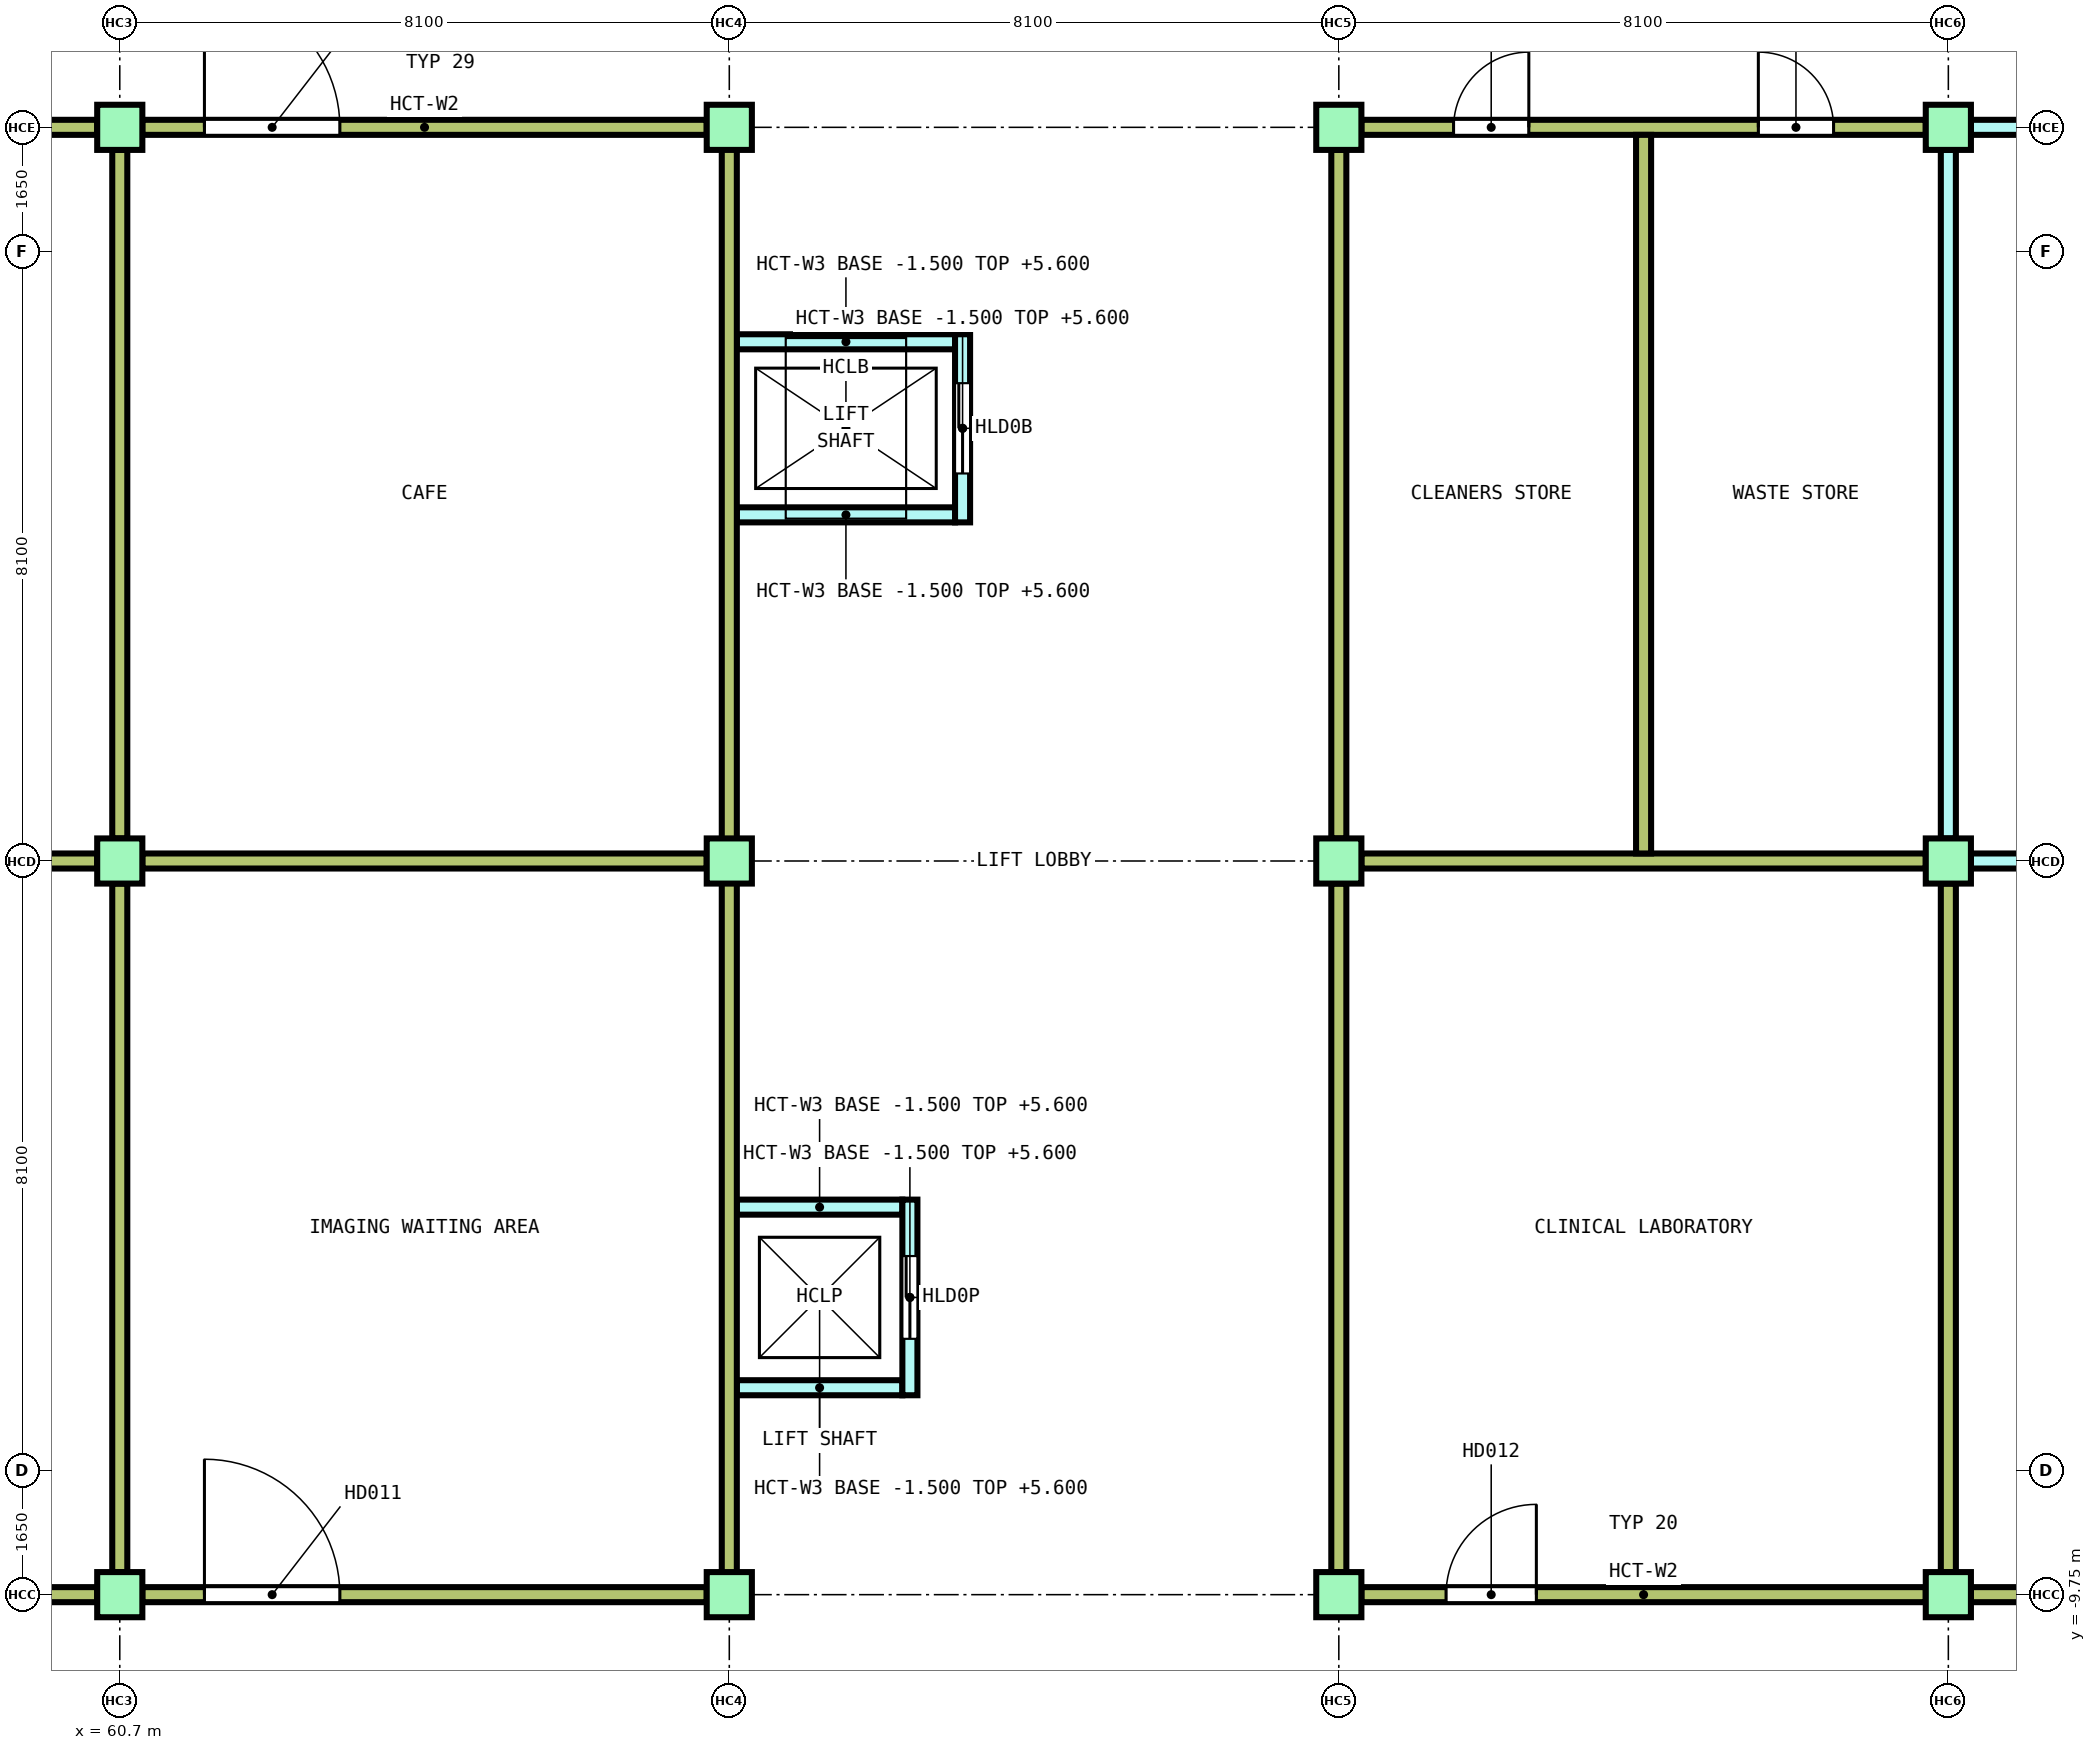
"""IFC4 building model, lengths in metres.
Left out: names, types, materials, properties, quantities, classifications, styles, units other than length and angle.
Written with IfcOpenShell. Run it as: python <this file> out.ifc"""

import sys

from ifc_helpers import new_model, si_unit, direction, frame, frame_2d, origin, origin_2d, place, context, subcontext, project, spatial, rectangle, extrude, element, fill, save


model = new_model("IFC4")
c1 = context("Model", 3, precision=1e-05, world=origin(), true_north=direction((0.0, 1.0)))
c2 = subcontext(c1, "Body", "Model", "MODEL_VIEW")
j1 = project(units=[si_unit("LENGTHUNIT", "METRE"), si_unit("PLANEANGLEUNIT", "RADIAN")], contexts=[c1])
p1 = place(None, origin())
s1 = spatial("IfcSite", under=j1, at=p1, CompositionType="ELEMENT")
p2 = place(p1, origin())
s2 = spatial("IfcBuilding", under=s1, at=p2, CompositionType="ELEMENT")
p3 = place(p2, origin())
s3 = spatial("IfcBuildingStorey", under=s2, at=p3, CompositionType="ELEMENT", Elevation=0.0)
for number, where, z_axis, x_axis in (
    (1, (60.7, -9.75, -0.25), (0.0, 0.0, 1.0), (1.0, 0.0, 0.0)),
    (2, (68.8, -9.75, -0.25), (0.0, 0.0, 1.0), (1.0, 0.0, 0.0)),
    (3, (76.9, -9.75, -0.25), (0.0, 0.0, 1.0), (1.0, 0.0, 0.0)),
    (4, (85.0, -9.75, -0.25), (0.0, 0.0, 1.0), (1.0, 0.0, 0.0)),
    (5, (60.7, 0.0, -0.25), (0.0, 0.0, 1.0), (1.0, 0.0, 0.0)),
    (6, (68.8, 0.0, -0.25), (0.0, 0.0, 1.0), (1.0, 0.0, 0.0)),
    (7, (76.9, 0.0, -0.25), (0.0, 0.0, 1.0), (1.0, 0.0, 0.0)),
    (8, (85.0, 0.0, -0.25), (0.0, 0.0, 1.0), (1.0, 0.0, 0.0)),
    (9, (60.7, 9.75, -0.25), (0.0, 0.0, 1.0), (1.0, 0.0, 0.0)),
    (10, (68.8, 9.75, -0.25), (0.0, 0.0, 1.0), (1.0, 0.0, 0.0)),
    (11, (76.9, 9.75, -0.25), (0.0, 0.0, 1.0), (1.0, 0.0, 0.0)),
    (12, (85.0, 9.75, -0.25), (0.0, 0.0, 1.0), (1.0, 0.0, 0.0)),
):
    element("IfcColumn", number, at=place(p3, frame(where, z_axis=z_axis, x_axis=x_axis)), inside=s3, PredefinedType="COLUMN", context=c2, shape_type="SweptSolid", body=[
        extrude(rectangle(XDim=0.6, YDim=0.6, at=origin_2d()), origin(), (0.0, 0.0, 1.0), 5.85),
    ])
for number, where, z_axis, x_axis in (
    (13, (68.9, -7.0, -1.5), (0.0, 0.0, 1.0), (1.0, 0.0, 0.0)),
    (14, (68.9, -4.6, -1.5), (0.0, 0.0, 1.0), (1.0, 0.0, 0.0)),
):
    element("IfcWall", number, at=place(p3, frame(where, z_axis=z_axis, x_axis=x_axis)), inside=s3, PredefinedType="SOLIDWALL", context=c2, shape_type="SweptSolid", body=[
        extrude(rectangle(XDim=2.2, YDim=0.2, at=frame_2d((1.1, 0.0))), origin(), (0.0, 0.0, 1.0), 7.1),
    ])
p4 = place(p3, frame((71.2, -7.1, -1.5), z_axis=(0.0, 0.0, 1.0), x_axis=(0.0, 1.0, 0.0)))
e15 = element("IfcWall", 15, at=p4, inside=s3, PredefinedType="SOLIDWALL", context=c2, shape_type="SweptSolid", body=[
    extrude(rectangle(XDim=2.6, YDim=0.2, at=frame_2d((1.3, 0.0))), origin(), (0.0, 0.0, 1.0), 7.1),
])
p5 = place(p4, frame((0.75, 0.0, 1.5)))
e16 = element("IfcOpeningElement", 16, at=p5, cuts=e15, PredefinedType="OPENING", context=c2, shape_type="SweptSolid", body=[
    extrude(rectangle(XDim=1.1, YDim=2.1, at=frame_2d((0.55, 1.05))), frame((0.0, 0.11, 0.0), z_axis=(0.0, -1.0, 0.0), x_axis=(1.0, 0.0, 0.0)), (0.0, 0.0, 1.0), 0.22),
])
for number, where, z_axis, x_axis in (
    (17, (68.9, 4.6, -1.5), (0.0, 0.0, 1.0), (1.0, 0.0, 0.0)),
    (18, (68.9, 6.9, -1.5), (0.0, 0.0, 1.0), (1.0, 0.0, 0.0)),
):
    element("IfcWall", number, at=place(p3, frame(where, z_axis=z_axis, x_axis=x_axis)), inside=s3, PredefinedType="SOLIDWALL", context=c2, shape_type="SweptSolid", body=[
        extrude(rectangle(XDim=2.9, YDim=0.2, at=frame_2d((1.45, 0.0))), origin(), (0.0, 0.0, 1.0), 7.1),
    ])
p6 = place(p3, frame((71.9, 4.5, -1.5), z_axis=(0.0, 0.0, 1.0), x_axis=(0.0, 1.0, 0.0)))
e19 = element("IfcWall", 19, at=p6, inside=s3, PredefinedType="SOLIDWALL", context=c2, shape_type="SweptSolid", body=[
    extrude(rectangle(XDim=2.5, YDim=0.2, at=frame_2d((1.25, 0.0))), origin(), (0.0, 0.0, 1.0), 7.1),
])
p7 = place(p6, frame((0.65, 0.0, 1.5)))
e20 = element("IfcOpeningElement", 20, at=p7, cuts=e19, PredefinedType="OPENING", context=c2, shape_type="SweptSolid", body=[
    extrude(rectangle(XDim=1.2, YDim=2.1, at=frame_2d((0.6, 1.05))), frame((0.0, 0.11, 0.0), z_axis=(0.0, -1.0, 0.0), x_axis=(1.0, 0.0, 0.0)), (0.0, 0.0, 1.0), 0.22),
])
for number, where, z_axis, x_axis in (
    (21, (60.7, -9.45, 0.0), (0.0, 0.0, 1.0), (0.0, 1.0, 0.0)),
    (22, (60.7, 0.3, 0.0), (0.0, 0.0, 1.0), (0.0, 1.0, 0.0)),
):
    element("IfcWall", number, at=place(p3, frame(where, z_axis=z_axis, x_axis=x_axis)), inside=s3, PredefinedType="PARTITIONING", context=c2, shape_type="SweptSolid", body=[
        extrude(rectangle(XDim=9.15, YDim=0.2, at=frame_2d((4.575, 0.0))), origin(), (0.0, 0.0, 1.0), 4.8),
    ])
p8 = place(p3, frame((52.9, -9.75, 0.0), z_axis=(0.0, 0.0, 1.0), x_axis=(1.0, 0.0, 0.0)))
e23 = element("IfcWall", 23, at=p8, inside=s3, PredefinedType="PARTITIONING", context=c2, shape_type="SweptSolid", body=[
    extrude(rectangle(XDim=7.5, YDim=0.2, at=frame_2d((3.75, 0.0))), origin(), (0.0, 0.0, 1.0), 4.8),
])
p9 = place(p8, frame((1.125, 0.0, 0.0)))
e24 = element("IfcOpeningElement", 24, at=p9, cuts=e23, PredefinedType="OPENING", context=c2, shape_type="SweptSolid", body=[
    extrude(rectangle(XDim=1.2, YDim=2.1, at=frame_2d((0.6, 1.05))), frame((0.0, 0.11, 0.0), z_axis=(0.0, -1.0, 0.0), x_axis=(1.0, 0.0, 0.0)), (0.0, 0.0, 1.0), 0.22),
])
p10 = place(p3, frame((61.0, -9.75, 0.0), z_axis=(0.0, 0.0, 1.0), x_axis=(1.0, 0.0, 0.0)))
e25 = element("IfcWall", 25, at=p10, inside=s3, PredefinedType="PARTITIONING", context=c2, shape_type="SweptSolid", body=[
    extrude(rectangle(XDim=7.5, YDim=0.2, at=frame_2d((3.75, 0.0))), origin(), (0.0, 0.0, 1.0), 4.8),
])
p11 = place(p10, frame((0.825, 0.0, 0.0)))
e26 = element("IfcOpeningElement", 26, at=p11, cuts=e25, PredefinedType="OPENING", context=c2, shape_type="SweptSolid", body=[
    extrude(rectangle(XDim=1.8, YDim=2.1, at=frame_2d((0.9, 1.05))), frame((0.0, 0.11, 0.0), z_axis=(0.0, -1.0, 0.0), x_axis=(1.0, 0.0, 0.0)), (0.0, 0.0, 1.0), 0.22),
])
p12 = place(p3, frame((77.2, -9.75, 0.0), z_axis=(0.0, 0.0, 1.0), x_axis=(1.0, 0.0, 0.0)))
e27 = element("IfcWall", 27, at=p12, inside=s3, PredefinedType="PARTITIONING", context=c2, shape_type="SweptSolid", body=[
    extrude(rectangle(XDim=7.5, YDim=0.2, at=frame_2d((3.75, 0.0))), origin(), (0.0, 0.0, 1.0), 4.8),
])
p13 = place(p12, frame((1.125, 0.0, 0.0)))
e28 = element("IfcOpeningElement", 28, at=p13, cuts=e27, PredefinedType="OPENING", context=c2, shape_type="SweptSolid", body=[
    extrude(rectangle(XDim=1.2, YDim=2.1, at=frame_2d((0.6, 1.05))), frame((0.0, 0.11, 0.0), z_axis=(0.0, -1.0, 0.0), x_axis=(1.0, 0.0, 0.0)), (0.0, 0.0, 1.0), 0.22),
])
p14 = place(p3, frame((85.3, -9.75, 0.0), z_axis=(0.0, 0.0, 1.0), x_axis=(1.0, 0.0, 0.0)))
e29 = element("IfcWall", 29, at=p14, inside=s3, PredefinedType="PARTITIONING", context=c2, shape_type="SweptSolid", body=[
    extrude(rectangle(XDim=7.5, YDim=0.2, at=frame_2d((3.75, 0.0))), origin(), (0.0, 0.0, 1.0), 4.8),
])
p15 = place(p14, frame((1.225, 0.0, 0.0)))
e30 = element("IfcOpeningElement", 30, at=p15, cuts=e29, PredefinedType="OPENING", context=c2, shape_type="SweptSolid", body=[
    extrude(rectangle(XDim=1.0, YDim=2.1, at=frame_2d((0.5, 1.05))), frame((0.0, 0.11, 0.0), z_axis=(0.0, -1.0, 0.0), x_axis=(1.0, 0.0, 0.0)), (0.0, 0.0, 1.0), 0.22),
])
p16 = place(p14, frame((5.275, 0.0, 0.0)))
e31 = element("IfcOpeningElement", 31, at=p16, cuts=e29, PredefinedType="OPENING", context=c2, shape_type="SweptSolid", body=[
    extrude(rectangle(XDim=1.0, YDim=2.1, at=frame_2d((0.5, 1.05))), frame((0.0, 0.11, 0.0), z_axis=(0.0, -1.0, 0.0), x_axis=(1.0, 0.0, 0.0)), (0.0, 0.0, 1.0), 0.22),
])
p17 = place(p3, frame((85.0, -9.45, 0.0), z_axis=(0.0, 0.0, 1.0), x_axis=(0.0, 1.0, 0.0)))
e32 = element("IfcWall", 32, at=p17, inside=s3, PredefinedType="PARTITIONING", context=c2, shape_type="SweptSolid", body=[
    extrude(rectangle(XDim=9.15, YDim=0.2, at=frame_2d((4.575, 0.0))), origin(), (0.0, 0.0, 1.0), 4.8),
])
p18 = place(p3, frame((85.0, 0.3, 0.0), z_axis=(0.0, 0.0, 1.0), x_axis=(0.0, 1.0, 0.0)))
e33 = element("IfcWall", 33, at=p18, inside=s3, PredefinedType="SOLIDWALL", context=c2, shape_type="SweptSolid", body=[
    extrude(rectangle(XDim=9.15, YDim=0.2, at=frame_2d((4.575, 0.0))), origin(), (0.0, 0.0, 1.0), 4.8),
])
for number, where, z_axis, x_axis in (
    (34, (52.9, 0.0, 0.0), (0.0, 0.0, 1.0), (1.0, 0.0, 0.0)),
    (35, (61.0, 0.0, 0.0), (0.0, 0.0, 1.0), (1.0, 0.0, 0.0)),
    (36, (77.2, 0.0, 0.0), (0.0, 0.0, 1.0), (1.0, 0.0, 0.0)),
):
    element("IfcWall", number, at=place(p3, frame(where, z_axis=z_axis, x_axis=x_axis)), inside=s3, PredefinedType="PARTITIONING", context=c2, shape_type="SweptSolid", body=[
        extrude(rectangle(XDim=7.5, YDim=0.2, at=frame_2d((3.75, 0.0))), origin(), (0.0, 0.0, 1.0), 4.8),
    ])
p19 = place(p3, frame((85.3, 0.0, 0.0), z_axis=(0.0, 0.0, 1.0), x_axis=(1.0, 0.0, 0.0)))
e37 = element("IfcWall", 37, at=p19, inside=s3, PredefinedType="SOLIDWALL", context=c2, shape_type="SweptSolid", body=[
    extrude(rectangle(XDim=7.5, YDim=0.2, at=frame_2d((3.75, 0.0))), origin(), (0.0, 0.0, 1.0), 4.8),
])
p20 = place(p3, frame((68.8, -9.75, 0.0), z_axis=(0.0, 0.0, 1.0), x_axis=(0.0, 1.0, 0.0)))
e38 = element("IfcWall", 38, at=p20, inside=s3, PredefinedType="PARTITIONING", context=c2, shape_type="SweptSolid", body=[
    extrude(rectangle(XDim=19.5, YDim=0.2, at=frame_2d((9.75, 0.0))), origin(), (0.0, 0.0, 1.0), 4.8),
])
for number, where, z_axis, x_axis in (
    (39, (76.9, -9.45, 0.0), (0.0, 0.0, 1.0), (0.0, 1.0, 0.0)),
    (40, (76.9, 0.3, 0.0), (0.0, 0.0, 1.0), (0.0, 1.0, 0.0)),
):
    element("IfcWall", number, at=place(p3, frame(where, z_axis=z_axis, x_axis=x_axis)), inside=s3, PredefinedType="PARTITIONING", context=c2, shape_type="SweptSolid", body=[
        extrude(rectangle(XDim=9.15, YDim=0.2, at=frame_2d((4.575, 0.0))), origin(), (0.0, 0.0, 1.0), 4.8),
    ])
p21 = place(p3, frame((52.9, 9.75, 0.0), z_axis=(0.0, 0.0, 1.0), x_axis=(1.0, 0.0, 0.0)))
e41 = element("IfcWall", 41, at=p21, inside=s3, PredefinedType="PARTITIONING", context=c2, shape_type="SweptSolid", body=[
    extrude(rectangle(XDim=7.5, YDim=0.2, at=frame_2d((3.75, 0.0))), origin(), (0.0, 0.0, 1.0), 4.8),
])
p22 = place(p21, frame((1.225, 0.0, 0.0)))
e42 = element("IfcOpeningElement", 42, at=p22, cuts=e41, PredefinedType="OPENING", context=c2, shape_type="SweptSolid", body=[
    extrude(rectangle(XDim=1.0, YDim=2.1, at=frame_2d((0.5, 1.05))), frame((0.0, 0.11, 0.0), z_axis=(0.0, -1.0, 0.0), x_axis=(1.0, 0.0, 0.0)), (0.0, 0.0, 1.0), 0.22),
])
p23 = place(p3, frame((61.0, 9.75, 0.0), z_axis=(0.0, 0.0, 1.0), x_axis=(1.0, 0.0, 0.0)))
e43 = element("IfcWall", 43, at=p23, inside=s3, PredefinedType="PARTITIONING", context=c2, shape_type="SweptSolid", body=[
    extrude(rectangle(XDim=7.5, YDim=0.2, at=frame_2d((3.75, 0.0))), origin(), (0.0, 0.0, 1.0), 4.8),
])
p24 = place(p23, frame((0.825, 0.0, 0.0)))
e44 = element("IfcOpeningElement", 44, at=p24, cuts=e43, PredefinedType="OPENING", context=c2, shape_type="SweptSolid", body=[
    extrude(rectangle(XDim=1.8, YDim=2.1, at=frame_2d((0.9, 1.05))), frame((0.0, 0.11, 0.0), z_axis=(0.0, -1.0, 0.0), x_axis=(1.0, 0.0, 0.0)), (0.0, 0.0, 1.0), 0.22),
])
p25 = place(p3, frame((77.2, 9.75, 0.0), z_axis=(0.0, 0.0, 1.0), x_axis=(1.0, 0.0, 0.0)))
e45 = element("IfcWall", 45, at=p25, inside=s3, PredefinedType="PARTITIONING", context=c2, shape_type="SweptSolid", body=[
    extrude(rectangle(XDim=7.5, YDim=0.2, at=frame_2d((3.75, 0.0))), origin(), (0.0, 0.0, 1.0), 4.8),
])
p26 = place(p25, frame((1.225, 0.0, 0.0)))
e46 = element("IfcOpeningElement", 46, at=p26, cuts=e45, PredefinedType="OPENING", context=c2, shape_type="SweptSolid", body=[
    extrude(rectangle(XDim=1.0, YDim=2.1, at=frame_2d((0.5, 1.05))), frame((0.0, 0.11, 0.0), z_axis=(0.0, -1.0, 0.0), x_axis=(1.0, 0.0, 0.0)), (0.0, 0.0, 1.0), 0.22),
])
p27 = place(p25, frame((5.275, 0.0, 0.0)))
e47 = element("IfcOpeningElement", 47, at=p27, cuts=e45, PredefinedType="OPENING", context=c2, shape_type="SweptSolid", body=[
    extrude(rectangle(XDim=1.0, YDim=2.1, at=frame_2d((0.5, 1.05))), frame((0.0, 0.11, 0.0), z_axis=(0.0, -1.0, 0.0), x_axis=(1.0, 0.0, 0.0)), (0.0, 0.0, 1.0), 0.22),
])
p28 = place(p3, frame((85.3, 9.75, 0.0), z_axis=(0.0, 0.0, 1.0), x_axis=(1.0, 0.0, 0.0)))
e48 = element("IfcWall", 48, at=p28, inside=s3, PredefinedType="SOLIDWALL", context=c2, shape_type="SweptSolid", body=[
    extrude(rectangle(XDim=7.5, YDim=0.2, at=frame_2d((3.75, 0.0))), origin(), (0.0, 0.0, 1.0), 4.8),
])
p29 = place(p28, frame((1.225, 0.0, 0.0)))
e49 = element("IfcOpeningElement", 49, at=p29, cuts=e48, PredefinedType="OPENING", context=c2, shape_type="SweptSolid", body=[
    extrude(rectangle(XDim=1.0, YDim=2.1, at=frame_2d((0.5, 1.05))), frame((0.0, 0.11, 0.0), z_axis=(0.0, -1.0, 0.0), x_axis=(1.0, 0.0, 0.0)), (0.0, 0.0, 1.0), 0.22),
])
p30 = place(p3, frame((80.95, 0.1, 0.0), z_axis=(0.0, 0.0, 1.0), x_axis=(0.0, 1.0, 0.0)))
e50 = element("IfcWall", 50, at=p30, inside=s3, PredefinedType="PARTITIONING", context=c2, shape_type="SweptSolid", body=[
    extrude(rectangle(XDim=9.55, YDim=0.2, at=frame_2d((4.775, 0.0))), origin(), (0.0, 0.0, 1.0), 4.8),
])
p31 = place(p5, origin())
e51 = element("IfcDoor", 51, at=p31, inside=s3, OperationType="SLIDING_TO_LEFT", PredefinedType="DOOR", context=c2, shape_type="SweptSolid", body=[
    extrude(rectangle(XDim=1.1, YDim=2.1, at=frame_2d((0.55, 1.05))), frame((0.0, 0.025, 0.0), z_axis=(0.0, -1.0, 0.0), x_axis=(1.0, 0.0, 0.0)), (0.0, 0.0, 1.0), 0.05),
])
fill(e16, e51)
p32 = place(p7, origin())
e52 = element("IfcDoor", 52, at=p32, inside=s3, OperationType="SLIDING_TO_LEFT", PredefinedType="DOOR", context=c2, shape_type="SweptSolid", body=[
    extrude(rectangle(XDim=1.2, YDim=2.1, at=frame_2d((0.6, 1.05))), frame((0.0, 0.025, 0.0), z_axis=(0.0, -1.0, 0.0), x_axis=(1.0, 0.0, 0.0)), (0.0, 0.0, 1.0), 0.05),
])
fill(e20, e52)
p33 = place(p11, origin())
e53 = element("IfcDoor", 53, at=p33, inside=s3, OperationType="DOUBLE_DOOR_SINGLE_SWING", PredefinedType="DOOR", context=c2, shape_type="SweptSolid", body=[
    extrude(rectangle(XDim=1.8, YDim=2.1, at=frame_2d((0.9, 1.05))), frame((0.0, 0.025, 0.0), z_axis=(0.0, -1.0, 0.0), x_axis=(1.0, 0.0, 0.0)), (0.0, 0.0, 1.0), 0.05),
])
fill(e26, e53)
p34 = place(p13, origin())
e54 = element("IfcDoor", 54, at=p34, inside=s3, OperationType="SINGLE_SWING_LEFT", PredefinedType="DOOR", context=c2, shape_type="SweptSolid", body=[
    extrude(rectangle(XDim=1.2, YDim=2.1, at=frame_2d((0.6, 1.05))), frame((0.0, 0.025, 0.0), z_axis=(0.0, -1.0, 0.0), x_axis=(1.0, 0.0, 0.0)), (0.0, 0.0, 1.0), 0.05),
])
fill(e28, e54)
p35 = place(p24, origin())
e55 = element("IfcDoor", 55, at=p35, inside=s3, OperationType="DOUBLE_DOOR_SINGLE_SWING", PredefinedType="DOOR", context=c2, shape_type="SweptSolid", body=[
    extrude(rectangle(XDim=1.8, YDim=2.1, at=frame_2d((0.9, 1.05))), frame((0.0, 0.025, 0.0), z_axis=(0.0, -1.0, 0.0), x_axis=(1.0, 0.0, 0.0)), (0.0, 0.0, 1.0), 0.05),
])
fill(e44, e55)
p36 = place(p26, origin())
e56 = element("IfcDoor", 56, at=p36, inside=s3, OperationType="SINGLE_SWING_LEFT", PredefinedType="DOOR", context=c2, shape_type="SweptSolid", body=[
    extrude(rectangle(XDim=1.0, YDim=2.1, at=frame_2d((0.5, 1.05))), frame((0.0, 0.025, 0.0), z_axis=(0.0, -1.0, 0.0), x_axis=(1.0, 0.0, 0.0)), (0.0, 0.0, 1.0), 0.05),
])
fill(e46, e56)
p37 = place(p27, origin())
e57 = element("IfcDoor", 57, at=p37, inside=s3, OperationType="SINGLE_SWING_RIGHT", PredefinedType="DOOR", context=c2, shape_type="SweptSolid", body=[
    extrude(rectangle(XDim=1.0, YDim=2.1, at=frame_2d((0.5, 1.05))), frame((0.0, 0.025, 0.0), z_axis=(0.0, -1.0, 0.0), x_axis=(1.0, 0.0, 0.0)), (0.0, 0.0, 1.0), 0.05),
])
fill(e47, e57)
save(model, sys.argv[1])
